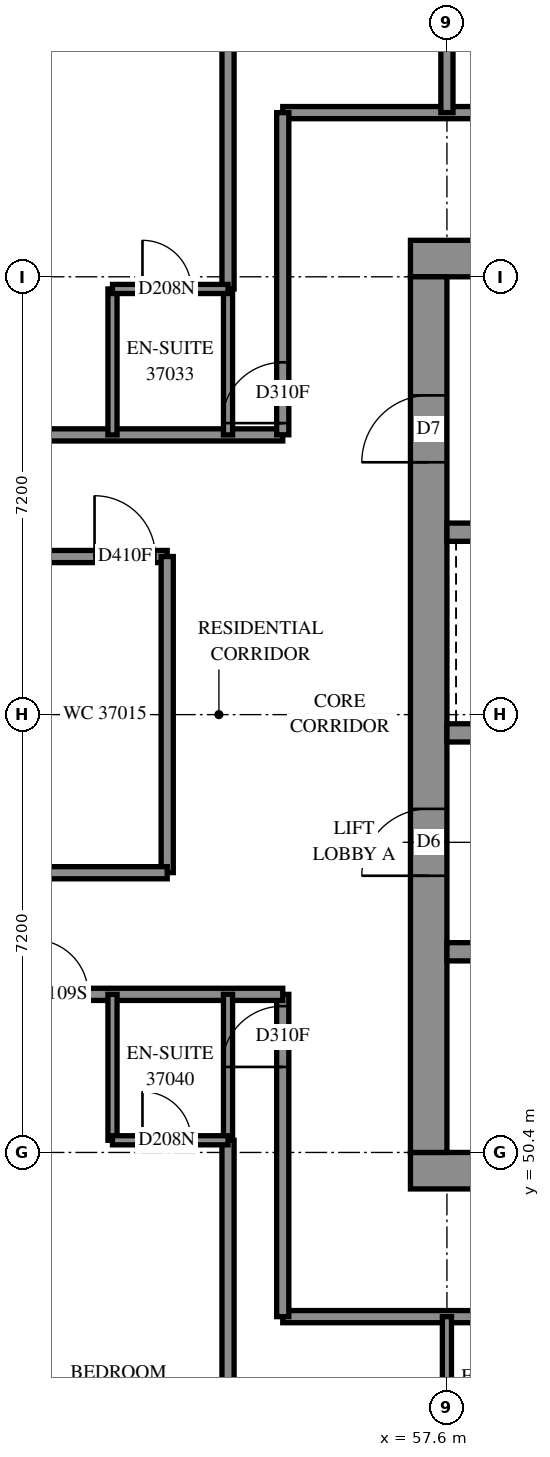
"""IFC4 building model, lengths in metres.
Left out: names, types, materials, properties, quantities, classifications, styles, units other than length and angle.
Written with IfcOpenShell. Run it as: python <this file> out.ifc"""

import sys

from ifc_helpers import new_model, si_unit, direction, frame, frame_2d, origin, place, context, subcontext, project, spatial, rectangle, extrude, element, fill, save


model = new_model("IFC4")
c1 = context("Model", 3, precision=1e-05, world=origin(), true_north=direction((0.0, 1.0)))
c2 = subcontext(c1, "Body", "Model", "MODEL_VIEW")
j1 = project(units=[si_unit("LENGTHUNIT", "METRE"), si_unit("PLANEANGLEUNIT", "RADIAN")], contexts=[c1])
p1 = place(None, origin())
s1 = spatial("IfcSite", under=j1, at=p1, CompositionType="ELEMENT")
p2 = place(p1, origin())
s2 = spatial("IfcBuilding", under=s1, at=p2, CompositionType="ELEMENT")
p3 = place(p2, frame((0.0, 0.0, 138.8)))
s3 = spatial("IfcBuildingStorey", under=s2, at=p3, CompositionType="ELEMENT", Elevation=138.8)
p4 = place(p3, frame((57.0, 50.1, -0.3), z_axis=(0.0, 0.0, 1.0), x_axis=(1.0, 0.0, 0.0)))
e1 = element("IfcWall", 1, at=p4, inside=s3, PredefinedType="SHEAR", context=c2, shape_type="SweptSolid", body=[
    extrude(rectangle(XDim=15.6, YDim=0.6, at=frame_2d((7.8, 0.0))), origin(), (0.0, 0.0, 1.0), 2.7),
])
p5 = place(p3, frame((57.0, 65.1, -0.3), z_axis=(0.0, 0.0, 1.0), x_axis=(1.0, 0.0, 0.0)))
e2 = element("IfcWall", 2, at=p5, inside=s3, PredefinedType="SHEAR", context=c2, shape_type="SweptSolid", body=[
    extrude(rectangle(XDim=15.6, YDim=0.6, at=frame_2d((7.8, 0.0))), origin(), (0.0, 0.0, 1.0), 2.7),
])
p6 = place(p5, frame((10.6, 0.0, 0.3)))
e3 = element("IfcOpeningElement", 3, at=p6, cuts=e2, PredefinedType="OPENING", context=c2, shape_type="SweptSolid", body=[
    extrude(rectangle(XDim=0.8, YDim=2.1, at=frame_2d((0.4, 1.05))), frame((0.0, 0.31, 0.0), z_axis=(0.0, -1.0, 0.0), x_axis=(1.0, 0.0, 0.0)), (0.0, 0.0, 1.0), 0.62),
])
p7 = place(p3, frame((57.3, 50.4, -0.3), z_axis=(0.0, 0.0, 1.0), x_axis=(0.0, 1.0, 0.0)))
e4 = element("IfcWall", 4, at=p7, inside=s3, PredefinedType="SHEAR", context=c2, shape_type="SweptSolid", body=[
    extrude(rectangle(XDim=14.4, YDim=0.6, at=frame_2d((7.2, 0.0))), origin(), (0.0, 0.0, 1.0), 2.7),
])
p8 = place(p7, frame((4.55, 0.0, 0.3)))
e5 = element("IfcOpeningElement", 5, at=p8, cuts=e4, PredefinedType="OPENING", context=c2, shape_type="SweptSolid", body=[
    extrude(rectangle(XDim=1.1, YDim=2.1, at=frame_2d((0.55, 1.05))), frame((0.0, 0.31, 0.0), z_axis=(0.0, -1.0, 0.0), x_axis=(1.0, 0.0, 0.0)), (0.0, 0.0, 1.0), 0.62),
])
p9 = place(p7, frame((11.35, 0.0, 0.3)))
e6 = element("IfcOpeningElement", 6, at=p9, cuts=e4, PredefinedType="OPENING", context=c2, shape_type="SweptSolid", body=[
    extrude(rectangle(XDim=1.1, YDim=2.1, at=frame_2d((0.55, 1.05))), frame((0.0, 0.31, 0.0), z_axis=(0.0, -1.0, 0.0), x_axis=(1.0, 0.0, 0.0)), (0.0, 0.0, 1.0), 0.62),
])
p10 = place(p3, frame((57.6, 53.7, 0.0), z_axis=(0.0, 0.0, 1.0), x_axis=(1.0, 0.0, 0.0)))
e7 = element("IfcWall", 7, at=p10, inside=s3, PredefinedType="SOLIDWALL", context=c2, shape_type="SweptSolid", body=[
    extrude(rectangle(XDim=14.4, YDim=0.3, at=frame_2d((7.2, 0.0))), origin(), (0.0, 0.0, 1.0), 3.1),
])
p11 = place(p10, frame((1.35, 0.0, 0.0)))
e8 = element("IfcOpeningElement", 8, at=p11, cuts=e7, PredefinedType="OPENING", context=c2, shape_type="SweptSolid", body=[
    extrude(rectangle(XDim=0.9, YDim=2.1, at=frame_2d((0.45, 1.05))), frame((0.0, 0.16, 0.0), z_axis=(0.0, -1.0, 0.0), x_axis=(1.0, 0.0, 0.0)), (0.0, 0.0, 1.0), 0.32),
])
p12 = place(p10, frame((4.95, 0.0, 0.0)))
e9 = element("IfcOpeningElement", 9, at=p12, cuts=e7, PredefinedType="OPENING", context=c2, shape_type="SweptSolid", body=[
    extrude(rectangle(XDim=0.9, YDim=2.1, at=frame_2d((0.45, 1.05))), frame((0.0, 0.16, 0.0), z_axis=(0.0, -1.0, 0.0), x_axis=(1.0, 0.0, 0.0)), (0.0, 0.0, 1.0), 0.32),
])
p13 = place(p10, frame((8.55, 0.0, 0.0)))
e10 = element("IfcOpeningElement", 10, at=p13, cuts=e7, PredefinedType="OPENING", context=c2, shape_type="SweptSolid", body=[
    extrude(rectangle(XDim=0.9, YDim=2.1, at=frame_2d((0.45, 1.05))), frame((0.0, 0.16, 0.0), z_axis=(0.0, -1.0, 0.0), x_axis=(1.0, 0.0, 0.0)), (0.0, 0.0, 1.0), 0.32),
])
p14 = place(p10, frame((12.05, 0.0, 0.0)))
e11 = element("IfcOpeningElement", 11, at=p14, cuts=e7, PredefinedType="OPENING", context=c2, shape_type="SweptSolid", body=[
    extrude(rectangle(XDim=1.1, YDim=2.1, at=frame_2d((0.55, 1.05))), frame((0.0, 0.16, 0.0), z_axis=(0.0, -1.0, 0.0), x_axis=(1.0, 0.0, 0.0)), (0.0, 0.0, 1.0), 0.32),
])
p15 = place(p3, frame((57.6, 57.3, 0.0), z_axis=(0.0, 0.0, 1.0), x_axis=(1.0, 0.0, 0.0)))
e12 = element("IfcWall", 12, at=p15, inside=s3, PredefinedType="SOLIDWALL", context=c2, shape_type="SweptSolid", body=[
    extrude(rectangle(XDim=14.4, YDim=0.3, at=frame_2d((7.2, 0.0))), origin(), (0.0, 0.0, 1.0), 3.1),
])
p16 = place(p15, frame((1.25, 0.0, 0.0)))
e13 = element("IfcOpeningElement", 13, at=p16, cuts=e12, PredefinedType="OPENING", context=c2, shape_type="SweptSolid", body=[
    extrude(rectangle(XDim=1.1, YDim=2.1, at=frame_2d((0.55, 1.05))), frame((0.0, 0.16, 0.0), z_axis=(0.0, -1.0, 0.0), x_axis=(1.0, 0.0, 0.0)), (0.0, 0.0, 1.0), 0.32),
])
p17 = place(p15, frame((4.85, 0.0, 0.0)))
e14 = element("IfcOpeningElement", 14, at=p17, cuts=e12, PredefinedType="OPENING", context=c2, shape_type="SweptSolid", body=[
    extrude(rectangle(XDim=1.1, YDim=2.1, at=frame_2d((0.55, 1.05))), frame((0.0, 0.16, 0.0), z_axis=(0.0, -1.0, 0.0), x_axis=(1.0, 0.0, 0.0)), (0.0, 0.0, 1.0), 0.32),
])
p18 = place(p15, frame((8.45, 0.0, 0.0)))
e15 = element("IfcOpeningElement", 15, at=p18, cuts=e12, PredefinedType="OPENING", context=c2, shape_type="SweptSolid", body=[
    extrude(rectangle(XDim=1.1, YDim=2.1, at=frame_2d((0.55, 1.05))), frame((0.0, 0.16, 0.0), z_axis=(0.0, -1.0, 0.0), x_axis=(1.0, 0.0, 0.0)), (0.0, 0.0, 1.0), 0.32),
])
p19 = place(p15, frame((12.05, 0.0, 0.0)))
e16 = element("IfcOpeningElement", 16, at=p19, cuts=e12, PredefinedType="OPENING", context=c2, shape_type="SweptSolid", body=[
    extrude(rectangle(XDim=1.1, YDim=2.1, at=frame_2d((0.55, 1.05))), frame((0.0, 0.16, 0.0), z_axis=(0.0, -1.0, 0.0), x_axis=(1.0, 0.0, 0.0)), (0.0, 0.0, 1.0), 0.32),
])
p20 = place(p3, frame((57.6, 60.6, 0.0), z_axis=(0.0, 0.0, 1.0), x_axis=(1.0, 0.0, 0.0)))
e17 = element("IfcWall", 17, at=p20, inside=s3, PredefinedType="SOLIDWALL", context=c2, shape_type="SweptSolid", body=[
    extrude(rectangle(XDim=7.2, YDim=0.3, at=frame_2d((3.6, 0.0))), origin(), (0.0, 0.0, 1.0), 3.1),
])
p21 = place(p3, frame((54.9, 67.5, 0.0), z_axis=(0.0, 0.0, 1.0), x_axis=(1.0, 0.0, 0.0)))
e18 = element("IfcWall", 18, at=p21, inside=s3, PredefinedType="PARTITIONING", context=c2, shape_type="SweptSolid", body=[
    extrude(rectangle(XDim=19.8, YDim=0.2, at=frame_2d((9.9, 0.0))), origin(), (0.0, 0.0, 1.0), 3.1),
])
p22 = place(p21, frame((6.586, 0.0, 0.0)))
e19 = element("IfcOpeningElement", 19, at=p22, cuts=e18, PredefinedType="OPENING", context=c2, shape_type="SweptSolid", body=[
    extrude(rectangle(XDim=1.0, YDim=2.1, at=frame_2d((0.5, 1.05))), frame((0.0, 0.11, 0.0), z_axis=(0.0, -1.0, 0.0), x_axis=(1.0, 0.0, 0.0)), (0.0, 0.0, 1.0), 0.22),
])
p23 = place(p21, frame((14.089, 0.0, 0.0)))
e20 = element("IfcOpeningElement", 20, at=p23, cuts=e18, PredefinedType="OPENING", context=c2, shape_type="SweptSolid", body=[
    extrude(rectangle(XDim=1.0, YDim=2.1, at=frame_2d((0.5, 1.05))), frame((0.0, 0.11, 0.0), z_axis=(0.0, -1.0, 0.0), x_axis=(1.0, 0.0, 0.0)), (0.0, 0.0, 1.0), 0.22),
])
p24 = place(p3, frame((54.9, 47.7, 0.0), z_axis=(0.0, 0.0, 1.0), x_axis=(1.0, 0.0, 0.0)))
e21 = element("IfcWall", 21, at=p24, inside=s3, PredefinedType="PARTITIONING", context=c2, shape_type="SweptSolid", body=[
    extrude(rectangle(XDim=19.326, YDim=0.2, at=frame_2d((9.663, 0.0))), origin(), (0.0, 0.0, 1.0), 3.1),
])
p25 = place(p24, frame((5.0, 0.0, 0.0)))
e22 = element("IfcOpeningElement", 22, at=p25, cuts=e21, PredefinedType="OPENING", context=c2, shape_type="SweptSolid", body=[
    extrude(rectangle(XDim=0.9, YDim=2.1, at=frame_2d((0.45, 1.05))), frame((0.0, 0.11, 0.0), z_axis=(0.0, -1.0, 0.0), x_axis=(1.0, 0.0, 0.0)), (0.0, 0.0, 1.0), 0.22),
])
p26 = place(p24, frame((12.2, 0.0, 0.0)))
e23 = element("IfcOpeningElement", 23, at=p26, cuts=e21, PredefinedType="OPENING", context=c2, shape_type="SweptSolid", body=[
    extrude(rectangle(XDim=0.9, YDim=2.1, at=frame_2d((0.45, 1.05))), frame((0.0, 0.11, 0.0), z_axis=(0.0, -1.0, 0.0), x_axis=(1.0, 0.0, 0.0)), (0.0, 0.0, 1.0), 0.22),
])
p27 = place(p24, frame((6.7, 0.0, 0.0)))
e24 = element("IfcOpeningElement", 24, at=p27, cuts=e21, PredefinedType="OPENING", context=c2, shape_type="SweptSolid", body=[
    extrude(rectangle(XDim=0.9, YDim=2.1, at=frame_2d((0.45, 1.05))), frame((0.0, 0.11, 0.0), z_axis=(0.0, -1.0, 0.0), x_axis=(1.0, 0.0, 0.0)), (0.0, 0.0, 1.0), 0.22),
])
p28 = place(p24, frame((13.9, 0.0, 0.0)))
e25 = element("IfcOpeningElement", 25, at=p28, cuts=e21, PredefinedType="OPENING", context=c2, shape_type="SweptSolid", body=[
    extrude(rectangle(XDim=0.9, YDim=2.1, at=frame_2d((0.45, 1.05))), frame((0.0, 0.11, 0.0), z_axis=(0.0, -1.0, 0.0), x_axis=(1.0, 0.0, 0.0)), (0.0, 0.0, 1.0), 0.22),
])
p29 = place(p3, frame((36.0, 60.2, 0.0), z_axis=(0.0, 0.0, 1.0), x_axis=(1.0, 0.0, 0.0)))
e26 = element("IfcWall", 26, at=p29, inside=s3, PredefinedType="PARTITIONING", context=c2, shape_type="SweptSolid", body=[
    extrude(rectangle(XDim=17.0, YDim=0.2, at=frame_2d((8.5, 0.0))), origin(), (0.0, 0.0, 1.0), 3.1),
])
p30 = place(p29, frame((15.805, 0.0, 0.0)))
e27 = element("IfcOpeningElement", 27, at=p30, cuts=e26, PredefinedType="OPENING", context=c2, shape_type="SweptSolid", body=[
    extrude(rectangle(XDim=1.0, YDim=2.1, at=frame_2d((0.5, 1.05))), frame((0.0, 0.11, 0.0), z_axis=(0.0, -1.0, 0.0), x_axis=(1.0, 0.0, 0.0)), (0.0, 0.0, 1.0), 0.22),
])
p31 = place(p29, frame((4.125, 0.0, 0.0)))
e28 = element("IfcOpeningElement", 28, at=p31, cuts=e26, PredefinedType="OPENING", context=c2, shape_type="SweptSolid", body=[
    extrude(rectangle(XDim=1.0, YDim=2.1, at=frame_2d((0.5, 1.05))), frame((0.0, 0.11, 0.0), z_axis=(0.0, -1.0, 0.0), x_axis=(1.0, 0.0, 0.0)), (0.0, 0.0, 1.0), 0.22),
])
p32 = place(p29, frame((7.55, 0.0, 0.0)))
e29 = element("IfcOpeningElement", 29, at=p32, cuts=e26, PredefinedType="OPENING", context=c2, shape_type="SweptSolid", body=[
    extrude(rectangle(XDim=0.9, YDim=2.1, at=frame_2d((0.45, 1.05))), frame((0.0, 0.11, 0.0), z_axis=(0.0, -1.0, 0.0), x_axis=(1.0, 0.0, 0.0)), (0.0, 0.0, 1.0), 0.22),
])
p33 = place(p29, frame((11.635, 0.0, 0.0)))
e30 = element("IfcOpeningElement", 30, at=p33, cuts=e26, PredefinedType="OPENING", context=c2, shape_type="SweptSolid", body=[
    extrude(rectangle(XDim=1.0, YDim=2.1, at=frame_2d((0.5, 1.05))), frame((0.0, 0.11, 0.0), z_axis=(0.0, -1.0, 0.0), x_axis=(1.0, 0.0, 0.0)), (0.0, 0.0, 1.0), 0.22),
])
p34 = place(p3, frame((40.602, 62.2, 0.0), z_axis=(0.0, 0.0, 1.0), x_axis=(1.0, 0.0, 0.0)))
e31 = element("IfcWall", 31, at=p34, inside=s3, PredefinedType="PARTITIONING", context=c2, shape_type="SweptSolid", body=[
    extrude(rectangle(XDim=14.298, YDim=0.2, at=frame_2d((7.149, 0.0))), origin(), (0.0, 0.0, 1.0), 3.1),
])
p35 = place(p34, frame((1.306, 0.0, 0.0)))
e32 = element("IfcOpeningElement", 32, at=p35, cuts=e31, PredefinedType="OPENING", context=c2, shape_type="SweptSolid", body=[
    extrude(rectangle(XDim=0.9, YDim=2.1, at=frame_2d((0.45, 1.05))), frame((0.0, 0.11, 0.0), z_axis=(0.0, -1.0, 0.0), x_axis=(1.0, 0.0, 0.0)), (0.0, 0.0, 1.0), 0.22),
])
p36 = place(p34, frame((8.455, 0.0, 0.0)))
e33 = element("IfcOpeningElement", 33, at=p36, cuts=e31, PredefinedType="OPENING", context=c2, shape_type="SweptSolid", body=[
    extrude(rectangle(XDim=0.9, YDim=2.1, at=frame_2d((0.45, 1.05))), frame((0.0, 0.11, 0.0), z_axis=(0.0, -1.0, 0.0), x_axis=(1.0, 0.0, 0.0)), (0.0, 0.0, 1.0), 0.22),
])
p37 = place(p3, frame((54.0, 42.369, 0.0), z_axis=(0.0, 0.0, 1.0), x_axis=(0.0, 1.0, 0.0)))
e34 = element("IfcWall", 34, at=p37, inside=s3, PredefinedType="PARTITIONING", context=c2, shape_type="SweptSolid", body=[
    extrude(rectangle(XDim=8.231, YDim=0.2, at=frame_2d((4.115, 0.0))), origin(), (0.0, 0.0, 1.0), 3.1),
])
p38 = place(p3, frame((54.0, 64.6, 0.0), z_axis=(0.0, 0.0, 1.0), x_axis=(0.0, 1.0, 0.0)))
e35 = element("IfcWall", 35, at=p38, inside=s3, PredefinedType="PARTITIONING", context=c2, shape_type="SweptSolid", body=[
    extrude(rectangle(XDim=8.136, YDim=0.2, at=frame_2d((4.068, 0.0))), origin(), (0.0, 0.0, 1.0), 3.1),
])
p39 = place(p3, frame((54.9, 47.7, 0.0), z_axis=(0.0, 0.0, 1.0), x_axis=(0.0, 1.0, 0.0)))
e36 = element("IfcWall", 36, at=p39, inside=s3, PredefinedType="PARTITIONING", context=c2, shape_type="SweptSolid", body=[
    extrude(rectangle(XDim=5.3, YDim=0.2, at=frame_2d((2.65, 0.0))), origin(), (0.0, 0.0, 1.0), 3.1),
])
p40 = place(p39, frame((4.106, 0.0, 0.0)))
e37 = element("IfcOpeningElement", 37, at=p40, cuts=e36, PredefinedType="OPENING", context=c2, shape_type="SweptSolid", body=[
    extrude(rectangle(XDim=1.0, YDim=2.1, at=frame_2d((0.5, 1.05))), frame((0.0, 0.11, 0.0), z_axis=(0.0, -1.0, 0.0), x_axis=(1.0, 0.0, 0.0)), (0.0, 0.0, 1.0), 0.22),
])
p41 = place(p3, frame((54.9, 62.202, 0.0), z_axis=(0.0, 0.0, 1.0), x_axis=(0.0, 1.0, 0.0)))
e38 = element("IfcWall", 38, at=p41, inside=s3, PredefinedType="PARTITIONING", context=c2, shape_type="SweptSolid", body=[
    extrude(rectangle(XDim=5.298, YDim=0.2, at=frame_2d((2.649, 0.0))), origin(), (0.0, 0.0, 1.0), 3.1),
])
p42 = place(p41, frame((0.192, 0.0, 0.0)))
e39 = element("IfcOpeningElement", 39, at=p42, cuts=e38, PredefinedType="OPENING", context=c2, shape_type="SweptSolid", body=[
    extrude(rectangle(XDim=1.0, YDim=2.1, at=frame_2d((0.5, 1.05))), frame((0.0, 0.11, 0.0), z_axis=(0.0, -1.0, 0.0), x_axis=(1.0, 0.0, 0.0)), (0.0, 0.0, 1.0), 0.22),
])
p43 = place(p3, frame((53.0, 55.002, 0.0), z_axis=(0.0, 0.0, 1.0), x_axis=(0.0, 1.0, 0.0)))
e40 = element("IfcWall", 40, at=p43, inside=s3, PredefinedType="PARTITIONING", context=c2, shape_type="SweptSolid", body=[
    extrude(rectangle(XDim=5.198, YDim=0.2, at=frame_2d((2.599, 0.0))), origin(), (0.0, 0.0, 1.0), 3.1),
])
p44 = place(p3, frame((50.4, 53.0, 0.0), z_axis=(0.0, 0.0, 1.0), x_axis=(1.0, 0.0, 0.0)))
e41 = element("IfcWall", 41, at=p44, inside=s3, PredefinedType="PARTITIONING", context=c2, shape_type="SweptSolid", body=[
    extrude(rectangle(XDim=4.5, YDim=0.2, at=frame_2d((2.25, 0.0))), origin(), (0.0, 0.0, 1.0), 3.1),
])
p45 = place(p44, frame((0.4, 0.0, 0.0)))
e42 = element("IfcOpeningElement", 42, at=p45, cuts=e41, PredefinedType="OPENING", context=c2, shape_type="SweptSolid", body=[
    extrude(rectangle(XDim=0.9, YDim=2.1, at=frame_2d((0.45, 1.05))), frame((0.0, 0.11, 0.0), z_axis=(0.0, -1.0, 0.0), x_axis=(1.0, 0.0, 0.0)), (0.0, 0.0, 1.0), 0.22),
])
p46 = place(p3, frame((57.6, 67.5, 0.0), z_axis=(0.0, 0.0, 1.0), x_axis=(0.0, 1.0, 0.0)))
e43 = element("IfcWall", 43, at=p46, inside=s3, PredefinedType="PARTITIONING", context=c2, shape_type="SweptSolid", body=[
    extrude(rectangle(XDim=4.05, YDim=0.2, at=frame_2d((2.025, 0.0))), origin(), (0.0, 0.0, 1.0), 3.1),
])
p47 = place(p3, frame((50.4, 55.0, 0.0), z_axis=(0.0, 0.0, 1.0), x_axis=(1.0, 0.0, 0.0)))
e44 = element("IfcWall", 44, at=p47, inside=s3, PredefinedType="PARTITIONING", context=c2, shape_type="SweptSolid", body=[
    extrude(rectangle(XDim=2.6, YDim=0.2, at=frame_2d((1.3, 0.0))), origin(), (0.0, 0.0, 1.0), 3.1),
])
for number, where, z_axis, x_axis in (
    (45, (57.6, 45.3, 0.0), (0.0, 0.0, 1.0), (0.0, 1.0, 0.0)),
    (46, (52.1, 50.6, 0.0), (0.0, 0.0, 1.0), (0.0, 1.0, 0.0)),
    (47, (54.0, 50.6, 0.0), (0.0, 0.0, 1.0), (0.0, 1.0, 0.0)),
    (48, (52.1, 62.2, 0.0), (0.0, 0.0, 1.0), (0.0, 1.0, 0.0)),
    (49, (54.0, 62.2, 0.0), (0.0, 0.0, 1.0), (0.0, 1.0, 0.0)),
):
    element("IfcWall", number, at=place(p3, frame(where, z_axis=z_axis, x_axis=x_axis)), inside=s3, PredefinedType="PARTITIONING", context=c2, shape_type="SweptSolid", body=[
        extrude(rectangle(XDim=2.4, YDim=0.15, at=frame_2d((1.2, 0.0))), origin(), (0.0, 0.0, 1.0), 3.1),
    ])
p48 = place(p3, frame((52.1, 64.6, 0.0), z_axis=(0.0, 0.0, 1.0), x_axis=(1.0, 0.0, 0.0)))
e50 = element("IfcWall", 50, at=p48, inside=s3, PredefinedType="PARTITIONING", context=c2, shape_type="SweptSolid", body=[
    extrude(rectangle(XDim=1.9, YDim=0.15, at=frame_2d((0.95, 0.0))), origin(), (0.0, 0.0, 1.0), 3.1),
])
p49 = place(p48, frame((0.493, 0.0, 0.0)))
e51 = element("IfcOpeningElement", 51, at=p49, cuts=e50, PredefinedType="OPENING", context=c2, shape_type="SweptSolid", body=[
    extrude(rectangle(XDim=0.8, YDim=2.1, at=frame_2d((0.4, 1.05))), frame((0.0, 0.085, 0.0), z_axis=(0.0, -1.0, 0.0), x_axis=(1.0, 0.0, 0.0)), (0.0, 0.0, 1.0), 0.17),
])
p50 = place(p3, frame((52.1, 50.6, 0.0), z_axis=(0.0, 0.0, 1.0), x_axis=(1.0, 0.0, 0.0)))
e52 = element("IfcWall", 52, at=p50, inside=s3, PredefinedType="PARTITIONING", context=c2, shape_type="SweptSolid", body=[
    extrude(rectangle(XDim=1.9, YDim=0.15, at=frame_2d((0.95, 0.0))), origin(), (0.0, 0.0, 1.0), 3.1),
])
p51 = place(p50, frame((0.493, 0.0, 0.0)))
e53 = element("IfcOpeningElement", 53, at=p51, cuts=e52, PredefinedType="OPENING", context=c2, shape_type="SweptSolid", body=[
    extrude(rectangle(XDim=0.8, YDim=2.1, at=frame_2d((0.4, 1.05))), frame((0.0, 0.085, 0.0), z_axis=(0.0, -1.0, 0.0), x_axis=(1.0, 0.0, 0.0)), (0.0, 0.0, 1.0), 0.17),
])
p52 = place(p8, origin())
e54 = element("IfcDoor", 54, at=p52, inside=s3, OperationType="DOUBLE_DOOR_SINGLE_SWING", PredefinedType="DOOR", context=c2, shape_type="SweptSolid", body=[
    extrude(rectangle(XDim=1.1, YDim=2.1, at=frame_2d((0.55, 1.05))), frame((0.0, 0.025, 0.0), z_axis=(0.0, -1.0, 0.0), x_axis=(1.0, 0.0, 0.0)), (0.0, 0.0, 1.0), 0.05),
])
fill(e5, e54)
p53 = place(p9, origin())
e55 = element("IfcDoor", 55, at=p53, inside=s3, OperationType="SINGLE_SWING_LEFT", PredefinedType="DOOR", context=c2, shape_type="SweptSolid", body=[
    extrude(rectangle(XDim=1.1, YDim=2.1, at=frame_2d((0.55, 1.05))), frame((0.0, 0.025, 0.0), z_axis=(0.0, -1.0, 0.0), x_axis=(1.0, 0.0, 0.0)), (0.0, 0.0, 1.0), 0.05),
])
fill(e6, e55)
p54 = place(p30, origin())
e56 = element("IfcDoor", 56, at=p54, inside=s3, OperationType="SINGLE_SWING_LEFT", PredefinedType="DOOR", context=c2, shape_type="SweptSolid", body=[
    extrude(rectangle(XDim=1.0, YDim=2.1, at=frame_2d((0.5, 1.05))), frame((0.0, 0.025, 0.0), z_axis=(0.0, -1.0, 0.0), x_axis=(1.0, 0.0, 0.0)), (0.0, 0.0, 1.0), 0.05),
])
fill(e27, e56)
p55 = place(p49, origin())
e57 = element("IfcDoor", 57, at=p55, inside=s3, OperationType="SINGLE_SWING_RIGHT", PredefinedType="DOOR", context=c2, shape_type="SweptSolid", body=[
    extrude(rectangle(XDim=0.8, YDim=2.1, at=frame_2d((0.4, 1.05))), frame((0.0, 0.025, 0.0), z_axis=(0.0, -1.0, 0.0), x_axis=(1.0, 0.0, 0.0)), (0.0, 0.0, 1.0), 0.05),
])
fill(e51, e57)
p56 = place(p42, origin())
e58 = element("IfcDoor", 58, at=p56, inside=s3, OperationType="SINGLE_SWING_LEFT", PredefinedType="DOOR", context=c2, shape_type="SweptSolid", body=[
    extrude(rectangle(XDim=1.0, YDim=2.1, at=frame_2d((0.5, 1.05))), frame((0.0, 0.025, 0.0), z_axis=(0.0, -1.0, 0.0), x_axis=(1.0, 0.0, 0.0)), (0.0, 0.0, 1.0), 0.05),
])
fill(e39, e58)
p57 = place(p45, origin())
e59 = element("IfcDoor", 59, at=p57, inside=s3, OperationType="SINGLE_SWING_LEFT", PredefinedType="DOOR", context=c2, shape_type="SweptSolid", body=[
    extrude(rectangle(XDim=0.9, YDim=2.1, at=frame_2d((0.45, 1.05))), frame((0.0, 0.025, 0.0), z_axis=(0.0, -1.0, 0.0), x_axis=(1.0, 0.0, 0.0)), (0.0, 0.0, 1.0), 0.05),
])
fill(e42, e59)
p58 = place(p51, origin())
e60 = element("IfcDoor", 60, at=p58, inside=s3, OperationType="SINGLE_SWING_RIGHT", PredefinedType="DOOR", context=c2, shape_type="SweptSolid", body=[
    extrude(rectangle(XDim=0.8, YDim=2.1, at=frame_2d((0.4, 1.05))), frame((0.0, 0.025, 0.0), z_axis=(0.0, -1.0, 0.0), x_axis=(1.0, 0.0, 0.0)), (0.0, 0.0, 1.0), 0.05),
])
fill(e53, e60)
p59 = place(p40, origin())
e61 = element("IfcDoor", 61, at=p59, inside=s3, OperationType="SINGLE_SWING_RIGHT", PredefinedType="DOOR", context=c2, shape_type="SweptSolid", body=[
    extrude(rectangle(XDim=1.0, YDim=2.1, at=frame_2d((0.5, 1.05))), frame((0.0, 0.025, 0.0), z_axis=(0.0, -1.0, 0.0), x_axis=(1.0, 0.0, 0.0)), (0.0, 0.0, 1.0), 0.05),
])
fill(e37, e61)
save(model, sys.argv[1])
